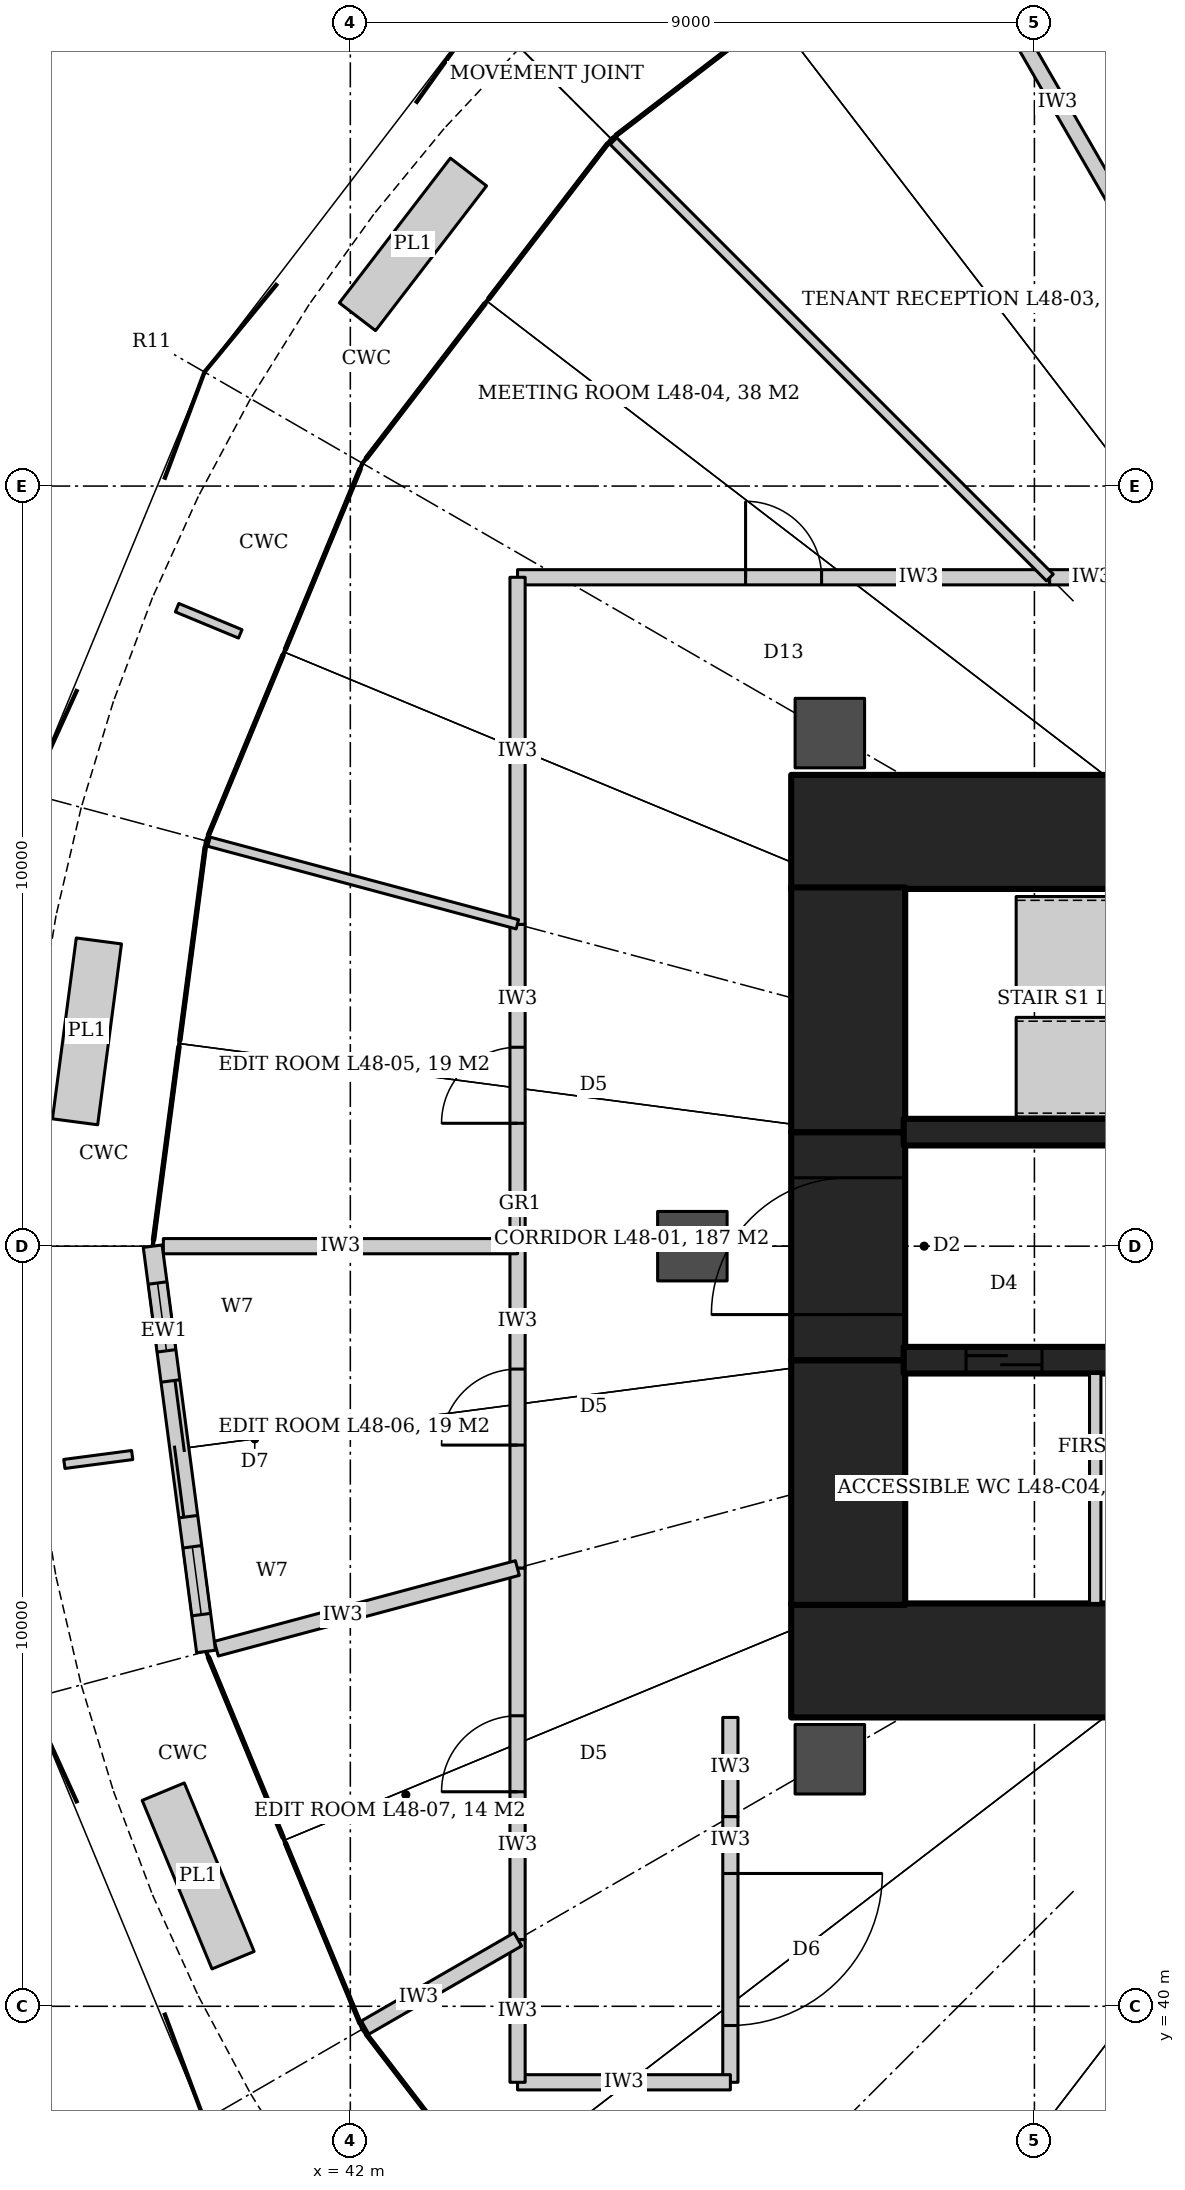
"""IFC4 building model, lengths in metres.
Left out: names, types, materials, properties, quantities, classifications, styles, units other than length and angle.
Written with IfcOpenShell. Run it as: python <this file> out.ifc"""

import sys

from ifc_helpers import new_model, si_unit, direction, frame, frame_2d, origin, origin_2d, place, context, subcontext, project, spatial, rectangle, hollow_circle, extrude, element, fill, save


model = new_model("IFC4")
c1 = context("Model", 3, precision=1e-05, world=origin(), true_north=direction((0.0, 1.0)))
c2 = subcontext(c1, "Body", "Model", "MODEL_VIEW")
j1 = project(units=[si_unit("LENGTHUNIT", "METRE"), si_unit("PLANEANGLEUNIT", "RADIAN")], contexts=[c1])
p1 = place(None, origin())
s1 = spatial("IfcSite", under=j1, at=p1, CompositionType="ELEMENT")
p2 = place(p1, origin())
s2 = spatial("IfcBuilding", under=s1, at=p2, CompositionType="ELEMENT")
p3 = place(p2, frame((0.0, 0.0, 202.4)))
s3 = spatial("IfcBuildingStorey", under=s2, at=p3, CompositionType="ELEMENT", Elevation=202.4)
for number, where, z_axis, x_axis in (
    (1, (47.8, 55.45, 0.0), (0.0, 0.0, 1.0), (1.0, 0.0, 0.0)),
    (2, (47.8, 44.55, 0.0), (0.0, 0.0, 1.0), (1.0, 0.0, 0.0)),
):
    element("IfcWall", number, at=place(p3, frame(where, z_axis=z_axis, x_axis=x_axis)), inside=s3, PredefinedType="SHEAR", context=c2, shape_type="SweptSolid", body=[
        extrude(rectangle(XDim=7.6, YDim=1.5, at=frame_2d((3.8, 0.0))), origin(), (0.0, 0.0, 1.0), 4.2),
    ])
p4 = place(p3, frame((48.55, 45.28, 0.0), z_axis=(0.0, 0.0, 1.0), x_axis=(0.0, 1.0, 0.0)))
e3 = element("IfcWall", 3, at=p4, inside=s3, PredefinedType="SHEAR", context=c2, shape_type="SweptSolid", body=[
    extrude(rectangle(XDim=3.22, YDim=1.5, at=frame_2d((1.61, 0.0))), origin(), (0.0, 0.0, 1.0), 4.2),
])
p5 = place(p3, frame((48.55, 48.5, 0.0), z_axis=(0.0, 0.0, 1.0), x_axis=(0.0, 1.0, 0.0)))
e4 = element("IfcWall", 4, at=p5, inside=s3, PredefinedType="SHEAR", context=c2, shape_type="SweptSolid", body=[
    extrude(rectangle(XDim=3.0, YDim=1.5, at=frame_2d((1.5, 0.0))), origin(), (0.0, 0.0, 1.0), 4.2),
])
p6 = place(p5, frame((0.6, 0.0, 0.0)))
e5 = element("IfcOpeningElement", 5, at=p6, cuts=e4, PredefinedType="OPENING", context=c2, shape_type="SweptSolid", body=[
    extrude(rectangle(XDim=1.8, YDim=2.1, at=frame_2d((0.9, 1.05))), frame((0.0, 0.76, 0.0), z_axis=(0.0, -1.0, 0.0), x_axis=(1.0, 0.0, 0.0)), (0.0, 0.0, 1.0), 1.52),
])
p7 = place(p3, frame((48.55, 51.5, 0.0), z_axis=(0.0, 0.0, 1.0), x_axis=(0.0, 1.0, 0.0)))
e6 = element("IfcWall", 6, at=p7, inside=s3, PredefinedType="SHEAR", context=c2, shape_type="SweptSolid", body=[
    extrude(rectangle(XDim=3.22, YDim=1.5, at=frame_2d((1.61, 0.0))), origin(), (0.0, 0.0, 1.0), 4.2),
])
p8 = place(p3, frame((49.28, 51.5, 0.0), z_axis=(0.0, 0.0, 1.0), x_axis=(1.0, 0.0, 0.0)))
e7 = element("IfcWall", 7, at=p8, inside=s3, PredefinedType="SHEAR", context=c2, shape_type="SweptSolid", body=[
    extrude(rectangle(XDim=6.12, YDim=0.35, at=frame_2d((3.06, 0.0))), origin(), (0.0, 0.0, 1.0), 4.2),
])
p9 = place(p8, frame((4.62, 0.0, 0.0)))
e8 = element("IfcOpeningElement", 8, at=p9, cuts=e7, PredefinedType="OPENING", context=c2, shape_type="SweptSolid", body=[
    extrude(rectangle(XDim=1.0, YDim=2.1, at=frame_2d((0.5, 1.05))), frame((0.0, 0.185, 0.0), z_axis=(0.0, -1.0, 0.0), x_axis=(1.0, 0.0, 0.0)), (0.0, 0.0, 1.0), 0.37),
])
p10 = place(p3, frame((49.28, 48.5, 0.0), z_axis=(0.0, 0.0, 1.0), x_axis=(1.0, 0.0, 0.0)))
e9 = element("IfcWall", 9, at=p10, inside=s3, PredefinedType="SHEAR", context=c2, shape_type="SweptSolid", body=[
    extrude(rectangle(XDim=6.12, YDim=0.35, at=frame_2d((3.06, 0.0))), origin(), (0.0, 0.0, 1.0), 4.2),
])
p11 = place(p10, frame((0.82, 0.0, 0.0)))
e10 = element("IfcOpeningElement", 10, at=p11, cuts=e9, PredefinedType="OPENING", context=c2, shape_type="SweptSolid", body=[
    extrude(rectangle(XDim=1.0, YDim=2.1, at=frame_2d((0.5, 1.05))), frame((0.0, 0.185, 0.0), z_axis=(0.0, -1.0, 0.0), x_axis=(1.0, 0.0, 0.0)), (0.0, 0.0, 1.0), 0.37),
])
p12 = place(p10, frame((2.92, 0.0, 0.0)))
e11 = element("IfcOpeningElement", 11, at=p12, cuts=e9, PredefinedType="OPENING", context=c2, shape_type="SweptSolid", body=[
    extrude(rectangle(XDim=0.9, YDim=2.1, at=frame_2d((0.45, 1.05))), frame((0.0, 0.185, 0.0), z_axis=(0.0, -1.0, 0.0), x_axis=(1.0, 0.0, 0.0)), (0.0, 0.0, 1.0), 0.37),
])
p13 = place(p10, frame((4.62, 0.0, 0.0)))
e12 = element("IfcOpeningElement", 12, at=p13, cuts=e9, PredefinedType="OPENING", context=c2, shape_type="SweptSolid", body=[
    extrude(rectangle(XDim=0.9, YDim=2.1, at=frame_2d((0.45, 1.05))), frame((0.0, 0.185, 0.0), z_axis=(0.0, -1.0, 0.0), x_axis=(1.0, 0.0, 0.0)), (0.0, 0.0, 1.0), 0.37),
])
for number, where, z_axis, x_axis in (
    (13, (48.309, 56.75, 0.0), (0.0, 0.0, 1.0), (1.0, 0.0, 0.0)),
    (14, (46.5, 50.0, 0.0), (0.0, 0.0, 1.0), (1.0, 0.0, 0.0)),
    (15, (48.309, 43.25, 0.0), (0.0, 0.0, 1.0), (1.0, 0.0, 0.0)),
):
    element("IfcColumn", number, at=place(p3, frame(where, z_axis=z_axis, x_axis=x_axis)), inside=s3, PredefinedType="COLUMN", context=c2, shape_type="SweptSolid", body=[
        extrude(hollow_circle(Radius=0.457, WallThickness=0.045, at=origin_2d()), origin(), (0.0, 0.0, 1.0), 4.2),
    ])
p14 = place(p3, frame((44.2, 58.8, 0.0), z_axis=(0.0, 0.0, 1.0), x_axis=(1.0, 0.0, 0.0)))
e16 = element("IfcWall", 16, at=p14, inside=s3, PredefinedType="PARTITIONING", context=c2, shape_type="SweptSolid", body=[
    extrude(rectangle(XDim=7.0, YDim=0.2, at=frame_2d((3.5, 0.0))), origin(), (0.0, 0.0, 1.0), 3.012),
])
p15 = place(p14, frame((3.0, 0.0, 0.0)))
e17 = element("IfcOpeningElement", 17, at=p15, cuts=e16, PredefinedType="OPENING", context=c2, shape_type="SweptSolid", body=[
    extrude(rectangle(XDim=1.0, YDim=2.4, at=frame_2d((0.5, 1.2))), frame((0.0, 0.11, 0.0), z_axis=(0.0, -1.0, 0.0), x_axis=(1.0, 0.0, 0.0)), (0.0, 0.0, 1.0), 0.22),
])
p16 = place(p3, frame((51.2, 58.8, 0.0), z_axis=(0.0, 0.0, 1.0), x_axis=(1.0, 0.0, 0.0)))
e18 = element("IfcWall", 18, at=p16, inside=s3, PredefinedType="PARTITIONING", context=c2, shape_type="SweptSolid", body=[
    extrude(rectangle(XDim=3.719, YDim=0.2, at=frame_2d((1.86, 0.0))), origin(), (0.0, 0.0, 1.0), 3.04),
])
p17 = place(p16, frame((1.06, 0.0, 0.0)))
e19 = element("IfcOpeningElement", 19, at=p17, cuts=e18, PredefinedType="OPENING", context=c2, shape_type="SweptSolid", body=[
    extrude(rectangle(XDim=1.6, YDim=2.4, at=frame_2d((0.8, 1.2))), frame((0.0, 0.11, 0.0), z_axis=(0.0, -1.0, 0.0), x_axis=(1.0, 0.0, 0.0)), (0.0, 0.0, 1.0), 0.22),
])
p18 = place(p3, frame((47.0, 43.8, 0.0), z_axis=(0.0, 0.0, 1.0), x_axis=(0.0, -1.0, 0.0)))
e20 = element("IfcWall", 20, at=p18, inside=s3, PredefinedType="PARTITIONING", context=c2, shape_type="SweptSolid", body=[
    extrude(rectangle(XDim=1.306, YDim=0.2, at=frame_2d((0.653, 0.0))), origin(), (0.0, 0.0, 1.0), 3.012),
])
p19 = place(p3, frame((47.0, 42.494, 0.0), z_axis=(0.0, 0.0, 1.0), x_axis=(0.0, -1.0, 0.0)))
e21 = element("IfcWall", 21, at=p19, inside=s3, PredefinedType="PARTITIONING", context=c2, shape_type="SweptSolid", body=[
    extrude(rectangle(XDim=3.494, YDim=0.2, at=frame_2d((1.747, 0.0))), origin(), (0.0, 0.0, 1.0), 3.012),
])
p20 = place(p19, frame((0.747, 0.0, 0.0)))
e22 = element("IfcOpeningElement", 22, at=p20, cuts=e21, PredefinedType="OPENING", context=c2, shape_type="SweptSolid", body=[
    extrude(rectangle(XDim=2.0, YDim=2.1, at=frame_2d((1.0, 1.05))), frame((0.0, 0.11, 0.0), z_axis=(0.0, -1.0, 0.0), x_axis=(1.0, 0.0, 0.0)), (0.0, 0.0, 1.0), 0.22),
])
p21 = place(p3, frame((47.0, 39.0, 0.0), z_axis=(0.0, 0.0, 1.0), x_axis=(-1.0, 0.0, 0.0)))
e23 = element("IfcWall", 23, at=p21, inside=s3, PredefinedType="PARTITIONING", context=c2, shape_type="SweptSolid", body=[
    extrude(rectangle(XDim=2.8, YDim=0.2, at=frame_2d((1.4, 0.0))), origin(), (0.0, 0.0, 1.0), 3.04),
])
p22 = place(p3, frame((44.2, 39.0, 0.0), z_axis=(0.0, 0.0, 1.0), x_axis=(0.0, 1.0, 0.0)))
e24 = element("IfcWall", 24, at=p22, inside=s3, PredefinedType="PARTITIONING", context=c2, shape_type="SweptSolid", body=[
    extrude(rectangle(XDim=1.878, YDim=0.2, at=frame_2d((0.939, 0.0))), origin(), (0.0, 0.0, 1.0), 3.012),
])
p23 = place(p3, frame((44.2, 40.878, 0.0), z_axis=(0.0, 0.0, 1.0), x_axis=(0.0, 1.0, 0.0)))
e25 = element("IfcWall", 25, at=p23, inside=s3, PredefinedType="PARTITIONING", context=c2, shape_type="SweptSolid", body=[
    extrude(rectangle(XDim=4.888, YDim=0.2, at=frame_2d((2.444, 0.0))), origin(), (0.0, 0.0, 1.0), 3.012),
])
p24 = place(p23, frame((1.944, 0.0, 0.0)))
e26 = element("IfcOpeningElement", 26, at=p24, cuts=e25, PredefinedType="OPENING", context=c2, shape_type="SweptSolid", body=[
    extrude(rectangle(XDim=1.0, YDim=2.1, at=frame_2d((0.5, 1.05))), frame((0.0, 0.11, 0.0), z_axis=(0.0, -1.0, 0.0), x_axis=(1.0, 0.0, 0.0)), (0.0, 0.0, 1.0), 0.22),
])
p25 = place(p3, frame((44.2, 45.766, 0.0), z_axis=(0.0, 0.0, 1.0), x_axis=(0.0, 1.0, 0.0)))
e27 = element("IfcWall", 27, at=p25, inside=s3, PredefinedType="PARTITIONING", context=c2, shape_type="SweptSolid", body=[
    extrude(rectangle(XDim=4.234, YDim=0.2, at=frame_2d((2.117, 0.0))), origin(), (0.0, 0.0, 1.0), 3.012),
])
p26 = place(p25, frame((1.617, 0.0, 0.0)))
e28 = element("IfcOpeningElement", 28, at=p26, cuts=e27, PredefinedType="OPENING", context=c2, shape_type="SweptSolid", body=[
    extrude(rectangle(XDim=1.0, YDim=2.1, at=frame_2d((0.5, 1.05))), frame((0.0, 0.11, 0.0), z_axis=(0.0, -1.0, 0.0), x_axis=(1.0, 0.0, 0.0)), (0.0, 0.0, 1.0), 0.22),
])
p27 = place(p3, frame((44.2, 50.0, 0.0), z_axis=(0.0, 0.0, 1.0), x_axis=(0.0, 1.0, 0.0)))
e29 = element("IfcWall", 29, at=p27, inside=s3, PredefinedType="PARTITIONING", context=c2, shape_type="SweptSolid", body=[
    extrude(rectangle(XDim=4.234, YDim=0.2, at=frame_2d((2.117, 0.0))), origin(), (0.0, 0.0, 1.0), 3.012),
])
p28 = place(p27, frame((1.617, 0.0, 0.0)))
e30 = element("IfcOpeningElement", 30, at=p28, cuts=e29, PredefinedType="OPENING", context=c2, shape_type="SweptSolid", body=[
    extrude(rectangle(XDim=1.0, YDim=2.1, at=frame_2d((0.5, 1.05))), frame((0.0, 0.11, 0.0), z_axis=(0.0, -1.0, 0.0), x_axis=(1.0, 0.0, 0.0)), (0.0, 0.0, 1.0), 0.22),
])
p29 = place(p3, frame((44.2, 54.234, 0.0), z_axis=(0.0, 0.0, 1.0), x_axis=(0.0, 1.0, 0.0)))
e31 = element("IfcWall", 31, at=p29, inside=s3, PredefinedType="PARTITIONING", context=c2, shape_type="SweptSolid", body=[
    extrude(rectangle(XDim=4.566, YDim=0.2, at=frame_2d((2.283, 0.0))), origin(), (0.0, 0.0, 1.0), 3.012),
])
p30 = place(p3, frame((52.892, 62.312, 0.0), z_axis=(0.0, 0.0, 1.0), x_axis=(-0.500011609405, 0.866018700987, 0.0)))
e32 = element("IfcWall", 32, at=p30, inside=s3, PredefinedType="PARTITIONING", context=c2, shape_type="SweptSolid", body=[
    extrude(rectangle(XDim=6.943, YDim=0.2, at=frame_2d((3.472, 0.0))), origin(), (0.0, 0.0, 1.0), 3.012),
])
p31 = place(p3, frame((51.204, 58.796, 0.0), z_axis=(0.0, 0.0, 1.0), x_axis=(-0.707106781187, 0.707106781187, 0.0)))
e33 = element("IfcWall", 33, at=p31, inside=s3, PredefinedType="PARTITIONING", context=c2, shape_type="SweptSolid", body=[
    extrude(rectangle(XDim=8.72, YDim=0.125, at=frame_2d((4.36, 0.0))), origin(), (0.0, 0.0, 1.0), 3.012),
])
p32 = place(p3, frame((44.198, 54.234, 0.0), z_axis=(0.0, 0.0, 1.0), x_axis=(-0.965933749146, 0.258789474786, 0.0)))
e34 = element("IfcWall", 34, at=p32, inside=s3, PredefinedType="PARTITIONING", context=c2, shape_type="SweptSolid", body=[
    extrude(rectangle(XDim=4.8, YDim=0.125, at=frame_2d((2.4, 0.0))), origin(), (0.0, 0.0, 1.0), 3.012),
])
p33 = place(p3, frame((44.2, 50.0, 0.0), z_axis=(0.0, 0.0, 1.0), x_axis=(-1.0, 0.0, 0.0)))
e35 = element("IfcWall", 35, at=p33, inside=s3, PredefinedType="PARTITIONING", context=c2, shape_type="SweptSolid", body=[
    extrude(rectangle(XDim=5.26, YDim=0.2, at=frame_2d((2.63, 0.0))), origin(), (0.0, 0.0, 1.0), 3.012),
])
p34 = place(p3, frame((44.198, 45.766, 0.0), z_axis=(0.0, 0.0, 1.0), x_axis=(-0.96593251702, -0.258794073665, 0.0)))
e36 = element("IfcWall", 36, at=p34, inside=s3, PredefinedType="PARTITIONING", context=c2, shape_type="SweptSolid", body=[
    extrude(rectangle(XDim=4.7, YDim=0.2, at=frame_2d((2.35, 0.0))), origin(), (0.0, 0.0, 1.0), 3.012),
])
p35 = place(p3, frame((44.204, 40.88, 0.0), z_axis=(0.0, 0.0, 1.0), x_axis=(-0.866032430508, -0.49998782916, 0.0)))
e37 = element("IfcWall", 37, at=p35, inside=s3, PredefinedType="PARTITIONING", context=c2, shape_type="SweptSolid", body=[
    extrude(rectangle(XDim=2.92, YDim=0.2, at=frame_2d((1.46, 0.0))), origin(), (0.0, 0.0, 1.0), 3.012),
])
p36 = place(p3, frame((38.8, 50.0, 0.0), z_axis=(0.0, 0.0, 1.0), x_axis=(0.130530967061, -0.991444232742, 0.0)))
e38 = element("IfcWall", 38, at=p36, inside=s3, PredefinedType="SOLIDWALL", context=c2, shape_type="SweptSolid", body=[
    extrude(rectangle(XDim=5.534, YDim=0.25, at=frame_2d((2.767, 0.0))), origin(), (0.0, 0.0, 1.0), 4.04),
])
p37 = place(p36, frame((1.867, 0.0, 0.0)))
e39 = element("IfcOpeningElement", 39, at=p37, cuts=e38, PredefinedType="OPENING", context=c2, shape_type="SweptSolid", body=[
    extrude(rectangle(XDim=1.8, YDim=2.4, at=frame_2d((0.9, 1.2))), frame((0.0, 0.135, 0.0), z_axis=(0.0, -1.0, 0.0), x_axis=(1.0, 0.0, 0.0)), (0.0, 0.0, 1.0), 0.27),
])
p38 = place(p36, frame((0.267, 0.0, 0.0)))
e40 = element("IfcOpeningElement", 40, at=p38, cuts=e38, PredefinedType="OPENING", context=c2, shape_type="SweptSolid", body=[
    extrude(rectangle(XDim=1.2, YDim=2.4, at=frame_2d((0.6, 1.2))), frame((0.0, 0.135, 0.0), z_axis=(0.0, -1.0, 0.0), x_axis=(1.0, 0.0, 0.0)), (0.0, 0.0, 1.0), 0.27),
])
p39 = place(p36, frame((4.067, 0.0, 0.0)))
e41 = element("IfcOpeningElement", 41, at=p39, cuts=e38, PredefinedType="OPENING", context=c2, shape_type="SweptSolid", body=[
    extrude(rectangle(XDim=1.2, YDim=2.4, at=frame_2d((0.6, 1.2))), frame((0.0, 0.135, 0.0), z_axis=(0.0, -1.0, 0.0), x_axis=(1.0, 0.0, 0.0)), (0.0, 0.0, 1.0), 0.27),
])
p40 = place(p3, frame((51.8, 45.3, 0.0), z_axis=(0.0, 0.0, 1.0), x_axis=(0.0, 1.0, 0.0)))
e42 = element("IfcWall", 42, at=p40, inside=s3, PredefinedType="PARTITIONING", context=c2, shape_type="SweptSolid", body=[
    extrude(rectangle(XDim=3.025, YDim=0.15, at=frame_2d((1.512, 0.0))), origin(), (0.0, 0.0, 1.0), 4.04),
])
p41 = place(p15, origin())
e43 = element("IfcDoor", 43, at=p41, inside=s3, OperationType="SINGLE_SWING_LEFT", PredefinedType="DOOR", context=c2, shape_type="SweptSolid", body=[
    extrude(rectangle(XDim=1.0, YDim=2.4, at=frame_2d((0.5, 1.2))), frame((0.0, 0.025, 0.0), z_axis=(0.0, -1.0, 0.0), x_axis=(1.0, 0.0, 0.0)), (0.0, 0.0, 1.0), 0.05),
])
fill(e17, e43)
p42 = place(p28, origin())
e44 = element("IfcDoor", 44, at=p42, inside=s3, OperationType="SINGLE_SWING_LEFT", PredefinedType="DOOR", context=c2, shape_type="SweptSolid", body=[
    extrude(rectangle(XDim=1.0, YDim=2.1, at=frame_2d((0.5, 1.05))), frame((0.0, 0.025, 0.0), z_axis=(0.0, -1.0, 0.0), x_axis=(1.0, 0.0, 0.0)), (0.0, 0.0, 1.0), 0.05),
])
fill(e30, e44)
p43 = place(p26, origin())
e45 = element("IfcDoor", 45, at=p43, inside=s3, OperationType="SINGLE_SWING_LEFT", PredefinedType="DOOR", context=c2, shape_type="SweptSolid", body=[
    extrude(rectangle(XDim=1.0, YDim=2.1, at=frame_2d((0.5, 1.05))), frame((0.0, 0.025, 0.0), z_axis=(0.0, -1.0, 0.0), x_axis=(1.0, 0.0, 0.0)), (0.0, 0.0, 1.0), 0.05),
])
fill(e28, e45)
p44 = place(p24, origin())
e46 = element("IfcDoor", 46, at=p44, inside=s3, OperationType="SINGLE_SWING_LEFT", PredefinedType="DOOR", context=c2, shape_type="SweptSolid", body=[
    extrude(rectangle(XDim=1.0, YDim=2.1, at=frame_2d((0.5, 1.05))), frame((0.0, 0.025, 0.0), z_axis=(0.0, -1.0, 0.0), x_axis=(1.0, 0.0, 0.0)), (0.0, 0.0, 1.0), 0.05),
])
fill(e26, e46)
p45 = place(p20, origin())
e47 = element("IfcDoor", 47, at=p45, inside=s3, OperationType="DOUBLE_DOOR_DOUBLE_SWING", PredefinedType="DOOR", context=c2, shape_type="SweptSolid", body=[
    extrude(rectangle(XDim=2.0, YDim=2.1, at=frame_2d((1.0, 1.05))), frame((0.0, 0.025, 0.0), z_axis=(0.0, -1.0, 0.0), x_axis=(1.0, 0.0, 0.0)), (0.0, 0.0, 1.0), 0.05),
])
fill(e22, e47)
p46 = place(p37, origin())
e48 = element("IfcDoor", 48, at=p46, inside=s3, OperationType="DOUBLE_DOOR_SLIDING", PredefinedType="DOOR", context=c2, shape_type="SweptSolid", body=[
    extrude(rectangle(XDim=1.8, YDim=2.4, at=frame_2d((0.9, 1.2))), frame((0.0, 0.025, 0.0), z_axis=(0.0, -1.0, 0.0), x_axis=(1.0, 0.0, 0.0)), (0.0, 0.0, 1.0), 0.05),
])
fill(e39, e48)
p47 = place(p38, origin())
e49 = element("IfcWindow", 49, at=p47, inside=s3, PartitioningType="SINGLE_PANEL", PredefinedType="WINDOW", context=c2, shape_type="SweptSolid", body=[
    extrude(rectangle(XDim=1.2, YDim=2.4, at=frame_2d((0.6, 1.2))), frame((0.0, 0.03, 0.0), z_axis=(0.0, -1.0, 0.0), x_axis=(1.0, 0.0, 0.0)), (0.0, 0.0, 1.0), 0.06),
])
fill(e40, e49)
p48 = place(p39, origin())
e50 = element("IfcWindow", 50, at=p48, inside=s3, PartitioningType="SINGLE_PANEL", PredefinedType="WINDOW", context=c2, shape_type="SweptSolid", body=[
    extrude(rectangle(XDim=1.2, YDim=2.4, at=frame_2d((0.6, 1.2))), frame((0.0, 0.03, 0.0), z_axis=(0.0, -1.0, 0.0), x_axis=(1.0, 0.0, 0.0)), (0.0, 0.0, 1.0), 0.06),
])
fill(e41, e50)
p49 = place(p11, origin())
e51 = element("IfcDoor", 51, at=p49, inside=s3, OperationType="SLIDING_TO_LEFT", PredefinedType="DOOR", context=c2, shape_type="SweptSolid", body=[
    extrude(rectangle(XDim=1.0, YDim=2.1, at=frame_2d((0.5, 1.05))), frame((0.0, 0.025, 0.0), z_axis=(0.0, -1.0, 0.0), x_axis=(1.0, 0.0, 0.0)), (0.0, 0.0, 1.0), 0.05),
])
fill(e10, e51)
p50 = place(p6, origin())
e52 = element("IfcDoor", 52, at=p50, inside=s3, OperationType="DOUBLE_DOOR_DOUBLE_SWING", PredefinedType="DOOR", context=c2, shape_type="SweptSolid", body=[
    extrude(rectangle(XDim=1.8, YDim=2.1, at=frame_2d((0.9, 1.05))), frame((0.0, 0.025, 0.0), z_axis=(0.0, -1.0, 0.0), x_axis=(1.0, 0.0, 0.0)), (0.0, 0.0, 1.0), 0.05),
])
fill(e5, e52)
save(model, sys.argv[1])
